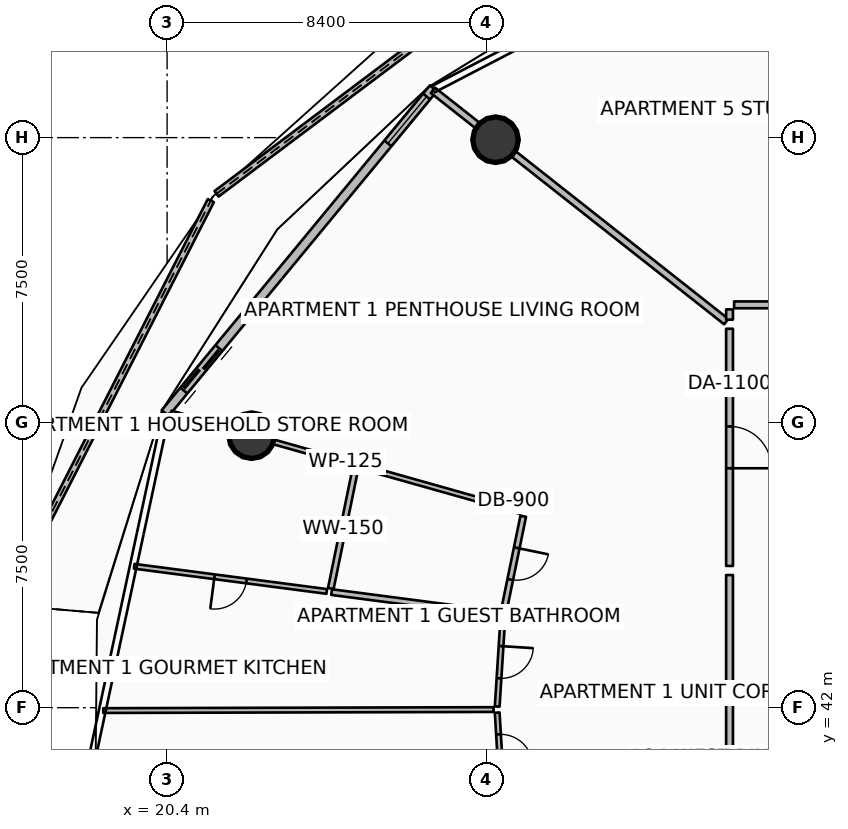
"""IFC4 building model, lengths in metres.
Left out: names, types, materials, properties, quantities, classifications, styles, units other than length and angle.
Written with IfcOpenShell. Run it as: python <this file> out.ifc"""

import sys

from ifc_helpers import new_model, si_unit, direction, frame, frame_2d, origin, origin_2d, place, context, subcontext, project, spatial, polyline, rectangle, circle, outline, extrude, element, fill, save


model = new_model("IFC4")
c1 = context("Model", 3, precision=1e-05, world=origin(), true_north=direction((0.0, 1.0)))
c2 = subcontext(c1, "Body", "Model", "MODEL_VIEW")
j1 = project(units=[si_unit("LENGTHUNIT", "METRE"), si_unit("PLANEANGLEUNIT", "RADIAN")], contexts=[c1])
p1 = place(None, origin())
s1 = spatial("IfcSite", under=j1, at=p1, CompositionType="ELEMENT")
p2 = place(p1, origin())
s2 = spatial("IfcBuilding", under=s1, at=p2, CompositionType="ELEMENT")
p3 = place(p2, frame((0.0, 0.0, 97.65)))
s3 = spatial("IfcBuildingStorey", under=s2, at=p3, CompositionType="ELEMENT", Elevation=97.65)
for number, where, z_axis, x_axis in (
    (1, (29.042, 56.945, 0.0), (0.0, 0.0, 1.0), (1.0, 0.0, 0.0)),
    (2, (22.623, 49.157, 0.0), (0.0, 0.0, 1.0), (1.0, 0.0, 0.0)),
):
    element("IfcColumn", number, at=place(p3, frame(where, z_axis=z_axis, x_axis=x_axis)), inside=s3, PredefinedType="COLUMN", context=c2, shape_type="SweptSolid", body=[
        extrude(circle(Radius=0.6, at=origin_2d()), origin(), (0.0, 0.0, 1.0), 3.5),
    ])
p4 = place(p3, frame((30.554, 62.175, 0.0), z_axis=(0.0, 0.0, 1.0), x_axis=(-0.799377932659, -0.600828528598, 0.0)))
e3 = element("IfcWall", 3, at=p4, inside=s3, PredefinedType="PARAPET", context=c2, shape_type="SweptSolid", body=[
    extrude(outline(polyline([(0.0, 0.0), (11.075, 0.0), (11.075, 1.348), (5.538, 1.182), (0.0, 1.12), (0.0, 0.0)])), frame((0.0, 0.09, 0.0), z_axis=(0.0, -1.0, 0.0), x_axis=(1.0, 0.0, 0.0)), (0.0, 0.0, 1.0), 0.18),
])
p5 = place(p3, frame((21.55, 55.342, 0.0), z_axis=(0.0, 0.0, 1.0), x_axis=(-0.454614998415, -0.890688050451, 0.0)))
e4 = element("IfcWall", 4, at=p5, inside=s3, PredefinedType="PARAPET", context=c2, shape_type="SweptSolid", body=[
    extrude(outline(polyline([(0.0, 0.0), (11.942, 0.0), (11.942, 1.747), (5.971, 1.562), (0.0, 1.348), (0.0, 0.0)])), frame((0.0, 0.09, 0.0), z_axis=(0.0, -1.0, 0.0), x_axis=(1.0, 0.0, 0.0)), (0.0, 0.0, 1.0), 0.18),
])
p6 = place(p3, frame((27.407, 58.298, 0.0), z_axis=(0.0, 0.0, 1.0), x_axis=(-0.636704975, -0.771107498868, 0.0)))
e5 = element("IfcWall", 5, at=p6, inside=s3, PredefinedType="SOLIDWALL", context=c2, shape_type="SweptSolid", body=[
    extrude(rectangle(XDim=11.084, YDim=0.24, at=frame_2d((5.542, 0.0))), origin(), (0.0, 0.0, 1.0), 2.45),
])
p7 = place(p6, frame((8.864, 0.0, 0.0)))
e6 = element("IfcOpeningElement", 6, at=p7, cuts=e5, PredefinedType="OPENING", context=c2, shape_type="SweptSolid", body=[
    extrude(rectangle(XDim=1.45, YDim=2.15, at=frame_2d((0.725, 1.075))), frame((0.0, 0.13, 0.0), z_axis=(0.0, -1.0, 0.0), x_axis=(1.0, 0.0, 0.0)), (0.0, 0.0, 1.0), 0.26),
])
p8 = place(p6, frame((0.28, 0.0, 0.65)))
e7 = element("IfcOpeningElement", 7, at=p8, cuts=e5, PredefinedType="OPENING", context=c2, shape_type="SweptSolid", body=[
    extrude(rectangle(XDim=1.6, YDim=1.5, at=frame_2d((0.8, 0.75))), frame((0.0, 0.13, 0.0), z_axis=(0.0, -1.0, 0.0), x_axis=(1.0, 0.0, 0.0)), (0.0, 0.0, 1.0), 0.26),
])
p9 = place(p3, frame((35.114, 52.159, 0.0), z_axis=(0.0, 0.0, 1.0), x_axis=(-0.785295873565, 0.619120659453, 0.0)))
e8 = element("IfcWall", 8, at=p9, inside=s3, PredefinedType="PARTITIONING", context=c2, shape_type="SweptSolid", body=[
    extrude(rectangle(XDim=9.829, YDim=0.18, at=frame_2d((4.915, 0.0))), origin(), (0.0, 0.0, 1.0), 2.94),
])
p10 = place(p3, frame((35.2, 51.971, 0.0), z_axis=(0.0, 0.0, 1.0), x_axis=(0.0, -1.0, 0.0)))
e9 = element("IfcWall", 9, at=p10, inside=s3, PredefinedType="PARTITIONING", context=c2, shape_type="SweptSolid", body=[
    extrude(rectangle(XDim=6.241, YDim=0.18, at=frame_2d((3.12, 0.0))), origin(), (0.0, 0.0, 1.0), 2.94),
])
p11 = place(p10, frame((2.57, 0.0, 0.0)))
e10 = element("IfcOpeningElement", 10, at=p11, cuts=e9, PredefinedType="OPENING", context=c2, shape_type="SweptSolid", body=[
    extrude(rectangle(XDim=1.1, YDim=2.1, at=frame_2d((0.55, 1.05))), frame((0.0, 0.1, 0.0), z_axis=(0.0, -1.0, 0.0), x_axis=(1.0, 0.0, 0.0)), (0.0, 0.0, 1.0), 0.2),
])
p12 = place(p3, frame((35.2, 45.49, 0.0), z_axis=(0.0, 0.0, 1.0), x_axis=(0.0, -1.0, 0.0)))
e11 = element("IfcWall", 11, at=p12, inside=s3, PredefinedType="PARTITIONING", context=c2, shape_type="SweptSolid", body=[
    extrude(rectangle(XDim=4.885, YDim=0.18, at=frame_2d((2.442, 0.0))), origin(), (0.0, 0.0, 1.0), 2.94),
])
p13 = place(p3, frame((29.695, 47.163, 0.0), z_axis=(0.0, 0.0, 1.0), x_axis=(-0.962455839824, 0.271438310467, 0.0)))
e12 = element("IfcWall", 12, at=p13, inside=s3, PredefinedType="PARTITIONING", context=c2, shape_type="SweptSolid", body=[
    extrude(rectangle(XDim=9.552, YDim=0.125, at=frame_2d((4.776, 0.0))), origin(), (0.0, 0.0, 1.0), 2.94),
])
p14 = place(p3, frame((29.771, 47.037, 0.0), z_axis=(0.0, 0.0, 1.0), x_axis=(-0.201031337284, -0.979584810739, 0.0)))
e13 = element("IfcWall", 13, at=p14, inside=s3, PredefinedType="PARTITIONING", context=c2, shape_type="SweptSolid", body=[
    extrude(rectangle(XDim=2.549, YDim=0.15, at=frame_2d((1.274, 0.0))), origin(), (0.0, 0.0, 1.0), 2.94),
])
p15 = place(p14, frame((0.85, 0.0, 0.0)))
e14 = element("IfcOpeningElement", 14, at=p15, cuts=e13, PredefinedType="OPENING", context=c2, shape_type="SweptSolid", body=[
    extrude(rectangle(XDim=0.85, YDim=2.06, at=frame_2d((0.425, 1.03))), frame((0.0, 0.085, 0.0), z_axis=(0.0, -1.0, 0.0), x_axis=(1.0, 0.0, 0.0)), (0.0, 0.0, 1.0), 0.17),
])
p16 = place(p3, frame((25.354, 48.283, 0.0), z_axis=(0.0, 0.0, 1.0), x_axis=(-0.201037617238, -0.979583521939, 0.0)))
e15 = element("IfcWall", 15, at=p16, inside=s3, PredefinedType="PARTITIONING", context=c2, shape_type="SweptSolid", body=[
    extrude(rectangle(XDim=3.213, YDim=0.15, at=frame_2d((1.607, 0.0))), origin(), (0.0, 0.0, 1.0), 2.94),
])
p17 = place(p3, frame((29.151, 44.464, 0.0), z_axis=(0.0, 0.0, 1.0), x_axis=(-0.991563130501, 0.129624682181, 0.0)))
e16 = element("IfcWall", 16, at=p17, inside=s3, PredefinedType="PARTITIONING", context=c2, shape_type="SweptSolid", body=[
    extrude(rectangle(XDim=4.46, YDim=0.15, at=frame_2d((2.23, 0.0))), origin(), (0.0, 0.0, 1.0), 2.94),
])
p18 = place(p3, frame((24.6, 45.059, 0.0), z_axis=(0.0, 0.0, 1.0), x_axis=(-0.991566000337, 0.129602727501, 0.0)))
e17 = element("IfcWall", 17, at=p18, inside=s3, PredefinedType="PARTITIONING", context=c2, shape_type="SweptSolid", body=[
    extrude(rectangle(XDim=5.109, YDim=0.125, at=frame_2d((2.554, 0.0))), origin(), (0.0, 0.0, 1.0), 2.94),
])
p19 = place(p18, frame((2.129, 0.0, 0.0)))
e18 = element("IfcOpeningElement", 18, at=p19, cuts=e17, PredefinedType="OPENING", context=c2, shape_type="SweptSolid", body=[
    extrude(rectangle(XDim=0.85, YDim=2.06, at=frame_2d((0.425, 1.03))), frame((0.0, 0.073, 0.0), z_axis=(0.0, -1.0, 0.0), x_axis=(1.0, 0.0, 0.0)), (0.0, 0.0, 1.0), 0.145),
])
p20 = place(p3, frame((28.991, 41.951, 0.0), z_axis=(0.0, 0.0, 1.0), x_axis=(-0.999996643903, -0.002590788034, 0.0)))
e19 = element("IfcWall", 19, at=p20, inside=s3, PredefinedType="PARTITIONING", context=c2, shape_type="SweptSolid", body=[
    extrude(rectangle(XDim=10.271, YDim=0.125, at=frame_2d((5.136, 0.0))), origin(), (0.0, 0.0, 1.0), 2.94),
])
p21 = place(p3, frame((29.235, 44.362, 0.0), z_axis=(0.0, 0.0, 1.0), x_axis=(-0.063647003528, -0.99797247404, 0.0)))
e20 = element("IfcWall", 20, at=p21, inside=s3, PredefinedType="PARTITIONING", context=c2, shape_type="SweptSolid", body=[
    extrude(rectangle(XDim=2.336, YDim=0.125, at=frame_2d((1.168, 0.0))), origin(), (0.0, 0.0, 1.0), 2.94),
])
p22 = place(p21, frame((0.743, 0.0, 0.0)))
e21 = element("IfcOpeningElement", 21, at=p22, cuts=e20, PredefinedType="OPENING", context=c2, shape_type="SweptSolid", body=[
    extrude(rectangle(XDim=0.85, YDim=2.06, at=frame_2d((0.425, 1.03))), frame((0.0, 0.073, 0.0), z_axis=(0.0, -1.0, 0.0), x_axis=(1.0, 0.0, 0.0)), (0.0, 0.0, 1.0), 0.145),
])
p23 = place(p3, frame((29.086, 41.871, 0.0), z_axis=(0.0, 0.0, 1.0), x_axis=(0.060104090143, -0.99819211495, 0.0)))
e22 = element("IfcWall", 22, at=p23, inside=s3, PredefinedType="PARTITIONING", context=c2, shape_type="SweptSolid", body=[
    extrude(rectangle(XDim=1.999, YDim=0.125, at=frame_2d((0.999, 0.0))), origin(), (0.0, 0.0, 1.0), 2.94),
])
p24 = place(p23, frame((0.574, 0.0, 0.0)))
e23 = element("IfcOpeningElement", 23, at=p24, cuts=e22, PredefinedType="OPENING", context=c2, shape_type="SweptSolid", body=[
    extrude(rectangle(XDim=0.85, YDim=2.06, at=frame_2d((0.425, 1.03))), frame((0.0, 0.073, 0.0), z_axis=(0.0, -1.0, 0.0), x_axis=(1.0, 0.0, 0.0)), (0.0, 0.0, 1.0), 0.145),
])
p25 = place(p3, frame((41.944, 52.6, 0.0), z_axis=(0.0, 0.0, 1.0), x_axis=(-1.0, 0.0, 0.0)))
e24 = element("IfcWall", 24, at=p25, inside=s3, PredefinedType="PARTITIONING", context=c2, shape_type="SweptSolid", body=[
    extrude(rectangle(XDim=6.624, YDim=0.18, at=frame_2d((3.312, 0.0))), origin(), (0.0, 0.0, 1.0), 2.94),
])
p26 = place(p25, frame((2.762, 0.0, 0.0)))
e25 = element("IfcOpeningElement", 25, at=p26, cuts=e24, PredefinedType="OPENING", context=c2, shape_type="SweptSolid", body=[
    extrude(rectangle(XDim=1.1, YDim=2.1, at=frame_2d((0.55, 1.05))), frame((0.0, 0.1, 0.0), z_axis=(0.0, -1.0, 0.0), x_axis=(1.0, 0.0, 0.0)), (0.0, 0.0, 1.0), 0.2),
])
p27 = place(p3, frame((35.2, 52.48, 0.0), z_axis=(0.0, 0.0, 1.0), x_axis=(0.0, -1.0, 0.0)))
e26 = element("IfcWall", 26, at=p27, inside=s3, PredefinedType="PARTITIONING", context=c2, shape_type="SweptSolid", body=[
    extrude(rectangle(XDim=0.269, YDim=0.18, at=frame_2d((0.135, 0.0))), origin(), (0.0, 0.0, 1.0), 2.94),
])
p28 = place(p7, origin())
e27 = element("IfcDoor", 27, at=p28, inside=s3, OperationType="DOUBLE_DOOR_SLIDING", PredefinedType="DOOR", context=c2, shape_type="SweptSolid", body=[
    extrude(rectangle(XDim=1.45, YDim=2.15, at=frame_2d((0.725, 1.075))), frame((0.0, 0.025, 0.0), z_axis=(0.0, -1.0, 0.0), x_axis=(1.0, 0.0, 0.0)), (0.0, 0.0, 1.0), 0.05),
])
fill(e6, e27)
p29 = place(p8, origin())
e28 = element("IfcWindow", 28, at=p29, inside=s3, PartitioningType="SINGLE_PANEL", PredefinedType="WINDOW", context=c2, shape_type="SweptSolid", body=[
    extrude(rectangle(XDim=1.6, YDim=1.5, at=frame_2d((0.8, 0.75))), frame((0.0, 0.03, 0.0), z_axis=(0.0, -1.0, 0.0), x_axis=(1.0, 0.0, 0.0)), (0.0, 0.0, 1.0), 0.06),
])
fill(e7, e28)
p30 = place(p11, origin())
e29 = element("IfcDoor", 29, at=p30, inside=s3, OperationType="SINGLE_SWING_RIGHT", PredefinedType="DOOR", context=c2, shape_type="SweptSolid", body=[
    extrude(rectangle(XDim=1.1, YDim=2.1, at=frame_2d((0.55, 1.05))), frame((0.0, 0.025, 0.0), z_axis=(0.0, -1.0, 0.0), x_axis=(1.0, 0.0, 0.0)), (0.0, 0.0, 1.0), 0.05),
])
fill(e10, e29)
p31 = place(p15, origin())
e30 = element("IfcDoor", 30, at=p31, inside=s3, OperationType="SINGLE_SWING_LEFT", PredefinedType="DOOR", context=c2, shape_type="SweptSolid", body=[
    extrude(rectangle(XDim=0.85, YDim=2.06, at=frame_2d((0.425, 1.03))), frame((0.0, 0.025, 0.0), z_axis=(0.0, -1.0, 0.0), x_axis=(1.0, 0.0, 0.0)), (0.0, 0.0, 1.0), 0.05),
])
fill(e14, e30)
p32 = place(p19, origin())
e31 = element("IfcDoor", 31, at=p32, inside=s3, OperationType="SINGLE_SWING_RIGHT", PredefinedType="DOOR", context=c2, shape_type="SweptSolid", body=[
    extrude(rectangle(XDim=0.85, YDim=2.06, at=frame_2d((0.425, 1.03))), frame((0.0, 0.025, 0.0), z_axis=(0.0, -1.0, 0.0), x_axis=(1.0, 0.0, 0.0)), (0.0, 0.0, 1.0), 0.05),
])
fill(e18, e31)
p33 = place(p22, origin())
e32 = element("IfcDoor", 32, at=p33, inside=s3, OperationType="SINGLE_SWING_LEFT", PredefinedType="DOOR", context=c2, shape_type="SweptSolid", body=[
    extrude(rectangle(XDim=0.85, YDim=2.06, at=frame_2d((0.425, 1.03))), frame((0.0, 0.025, 0.0), z_axis=(0.0, -1.0, 0.0), x_axis=(1.0, 0.0, 0.0)), (0.0, 0.0, 1.0), 0.05),
])
fill(e21, e32)
p34 = place(p24, origin())
e33 = element("IfcDoor", 33, at=p34, inside=s3, OperationType="SINGLE_SWING_RIGHT", PredefinedType="DOOR", context=c2, shape_type="SweptSolid", body=[
    extrude(rectangle(XDim=0.85, YDim=2.06, at=frame_2d((0.425, 1.03))), frame((0.0, 0.025, 0.0), z_axis=(0.0, -1.0, 0.0), x_axis=(1.0, 0.0, 0.0)), (0.0, 0.0, 1.0), 0.05),
])
fill(e23, e33)
save(model, sys.argv[1])
